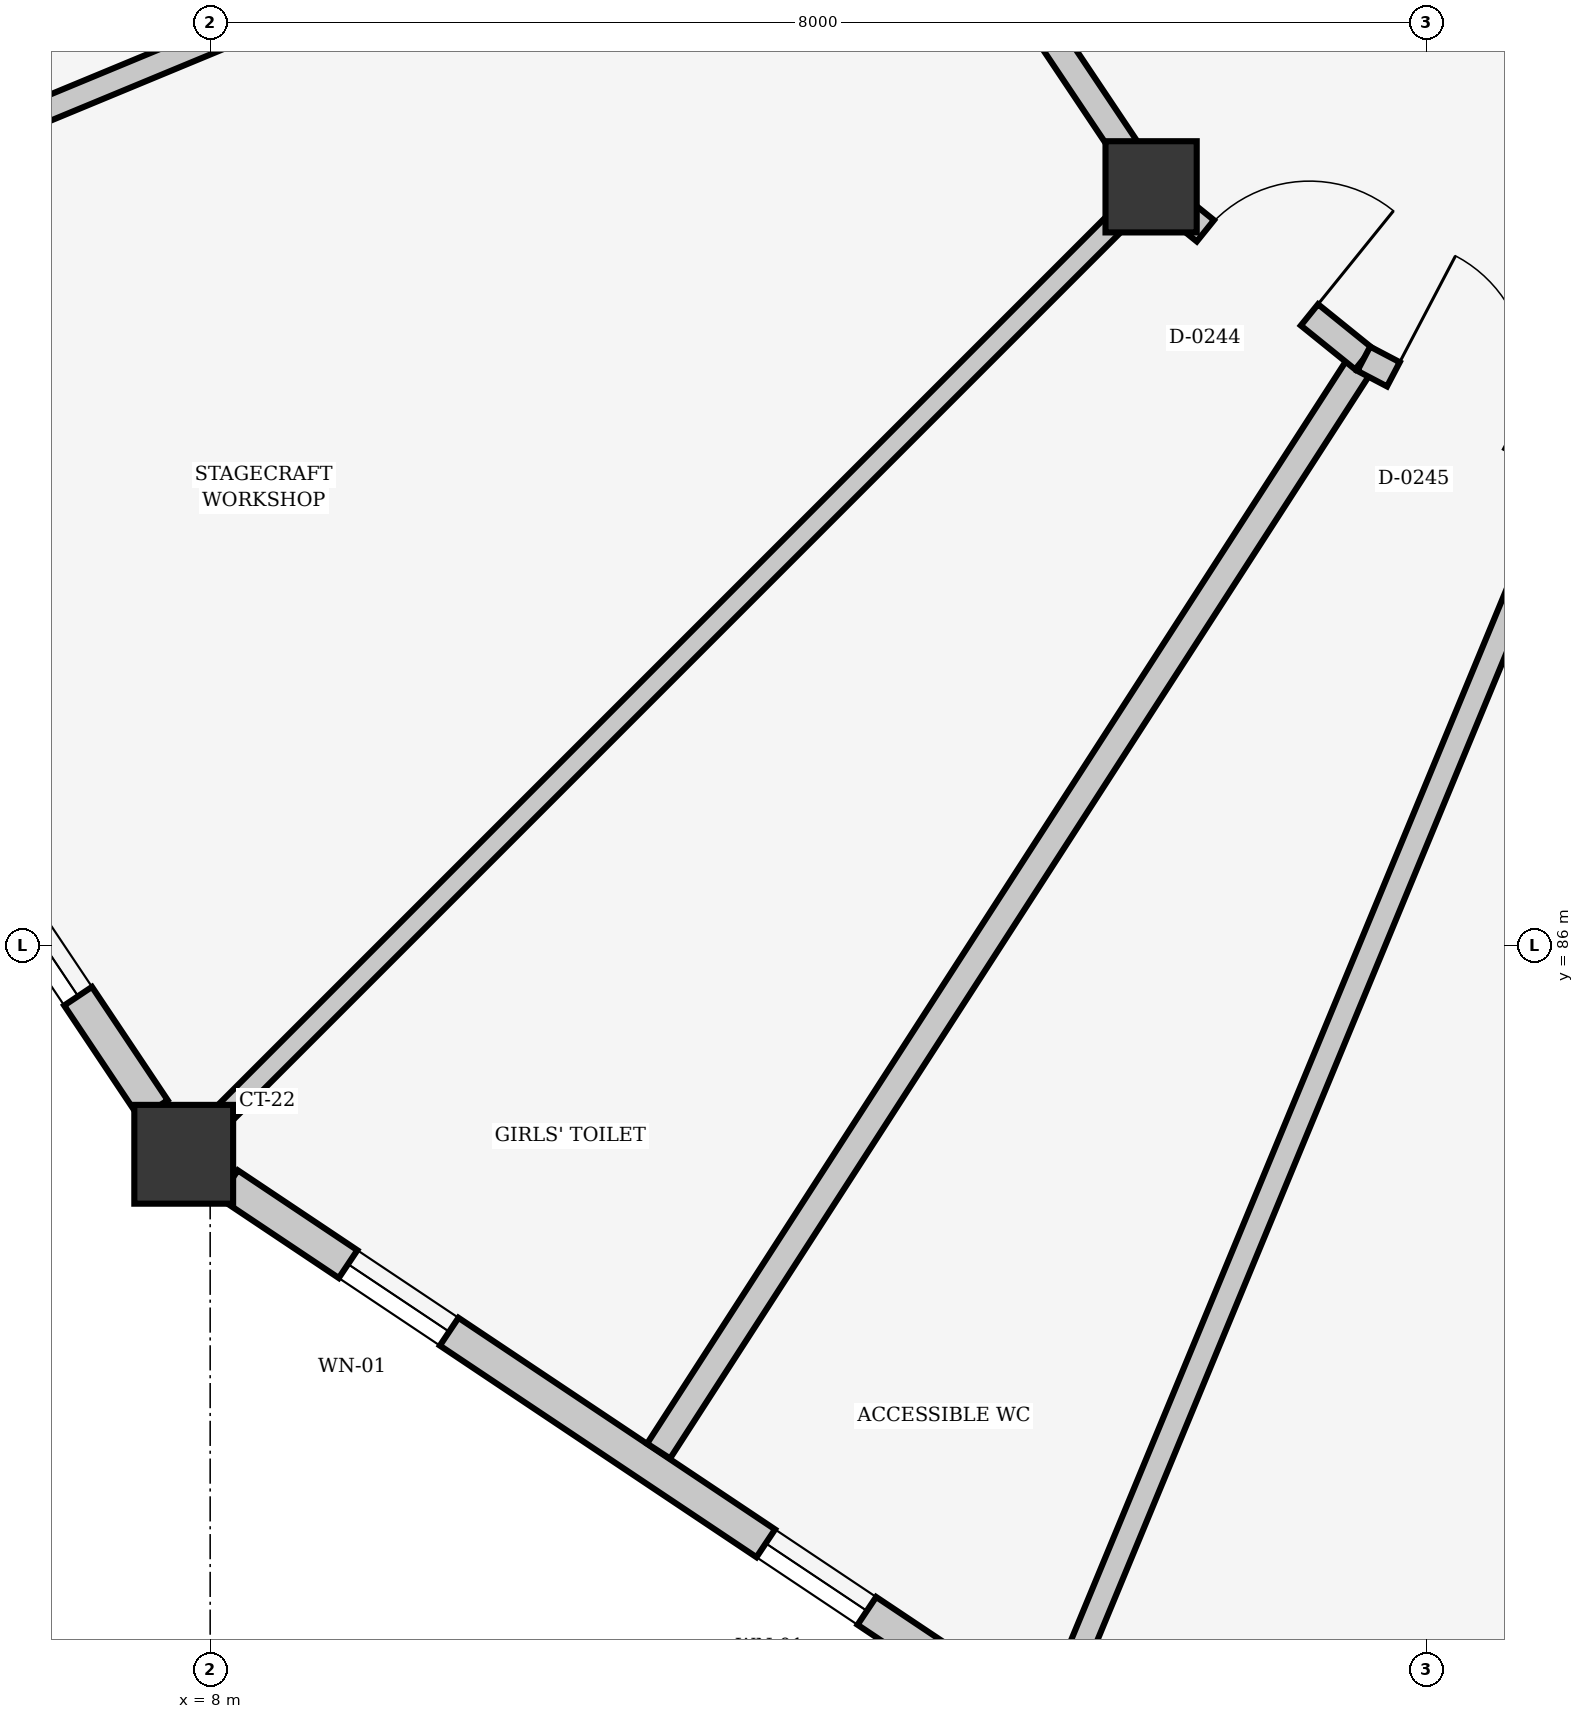
"""IFC4 building model, lengths in metres.
Left out: names, types, materials, properties, quantities, classifications, styles, units other than length and angle.
Written with IfcOpenShell. Run it as: python <this file> out.ifc"""

import sys

from ifc_helpers import new_model, si_unit, direction, frame, frame_2d, origin, origin_2d, place, context, subcontext, project, spatial, rectangle, extrude, element, fill, save


model = new_model("IFC4")
c1 = context("Model", 3, precision=1e-05, world=origin(), true_north=direction((0.0, 1.0)))
c2 = subcontext(c1, "Body", "Model", "MODEL_VIEW")
j1 = project(units=[si_unit("LENGTHUNIT", "METRE"), si_unit("PLANEANGLEUNIT", "RADIAN")], contexts=[c1])
p1 = place(None, origin())
s1 = spatial("IfcSite", under=j1, at=p1, CompositionType="ELEMENT")
p2 = place(p1, origin())
s2 = spatial("IfcBuilding", under=s1, at=p2, CompositionType="ELEMENT")
p3 = place(p2, origin())
s3 = spatial("IfcBuildingStorey", under=s2, at=p3, CompositionType="ELEMENT", Elevation=0.0)
p4 = place(p3, frame((14.19, 90.99, 0.0), z_axis=(0.0, 0.0, 1.0), x_axis=(-0.707106781187, -0.707106781187, 0.0)))
e1 = element("IfcColumn", 1, at=p4, inside=s3, PredefinedType="COLUMN", context=c2, shape_type="SweptSolid", body=[
    extrude(rectangle(XDim=0.6, YDim=0.6, at=origin_2d()), origin(), (0.0, 0.0, 1.0), 4.5),
])
p5 = place(p3, frame((7.826, 84.626, 0.0), z_axis=(0.0, 0.0, 1.0), x_axis=(-0.707106781187, -0.707106781187, 0.0)))
e2 = element("IfcColumn", 2, at=p5, inside=s3, PredefinedType="COLUMN", context=c2, shape_type="SweptSolid", body=[
    extrude(rectangle(XDim=0.65, YDim=0.65, at=origin_2d()), origin(), (0.0, 0.0, 1.0), 4.5),
])
p6 = place(p3, frame((7.629, 84.921, 0.0), z_axis=(0.0, 0.0, 1.0), x_axis=(-0.555657446161, 0.831411331728, 0.0)))
e3 = element("IfcWall", 3, at=p6, inside=s3, PredefinedType="SOLIDWALL", context=c2, shape_type="SweptSolid", body=[
    extrude(rectangle(XDim=6.119, YDim=0.22, at=frame_2d((3.059, 0.0))), origin(), (0.0, 0.0, 1.0), 3.55),
])
p7 = place(p6, frame((0.896, 0.0, 0.85)))
e4 = element("IfcOpeningElement", 4, at=p7, cuts=e3, PredefinedType="OPENING", context=c2, shape_type="SweptSolid", body=[
    extrude(rectangle(XDim=0.9, YDim=1.4, at=frame_2d((0.45, 0.7))), frame((0.0, 0.12, 0.0), z_axis=(0.0, -1.0, 0.0), x_axis=(1.0, 0.0, 0.0)), (0.0, 0.0, 1.0), 0.24),
])
p8 = place(p6, frame((2.609, 0.0, 0.85)))
e5 = element("IfcOpeningElement", 5, at=p8, cuts=e3, PredefinedType="OPENING", context=c2, shape_type="SweptSolid", body=[
    extrude(rectangle(XDim=0.9, YDim=1.4, at=frame_2d((0.45, 0.7))), frame((0.0, 0.12, 0.0), z_axis=(0.0, -1.0, 0.0), x_axis=(1.0, 0.0, 0.0)), (0.0, 0.0, 1.0), 0.24),
])
p9 = place(p6, frame((4.323, 0.0, 0.85)))
e6 = element("IfcOpeningElement", 6, at=p9, cuts=e3, PredefinedType="OPENING", context=c2, shape_type="SweptSolid", body=[
    extrude(rectangle(XDim=0.9, YDim=1.4, at=frame_2d((0.45, 0.7))), frame((0.0, 0.12, 0.0), z_axis=(0.0, -1.0, 0.0), x_axis=(1.0, 0.0, 0.0)), (0.0, 0.0, 1.0), 0.24),
])
p10 = place(p3, frame((13.208, 81.029, 0.0), z_axis=(0.0, 0.0, 1.0), x_axis=(-0.83139901156, 0.555675879967, 0.0)))
e7 = element("IfcWall", 7, at=p10, inside=s3, PredefinedType="SOLIDWALL", context=c2, shape_type="SweptSolid", body=[
    extrude(rectangle(XDim=6.118, YDim=0.22, at=frame_2d((3.059, 0.0))), origin(), (0.0, 0.0, 1.0), 3.55),
])
p11 = place(p10, frame((1.068, 0.0, 1.15)))
e8 = element("IfcOpeningElement", 8, at=p11, cuts=e7, PredefinedType="OPENING", context=c2, shape_type="SweptSolid", body=[
    extrude(rectangle(XDim=0.8, YDim=1.1, at=frame_2d((0.4, 0.55))), frame((0.0, 0.12, 0.0), z_axis=(0.0, -1.0, 0.0), x_axis=(1.0, 0.0, 0.0)), (0.0, 0.0, 1.0), 0.24),
])
p12 = place(p10, frame((4.373, 0.0, 1.15)))
e9 = element("IfcOpeningElement", 9, at=p12, cuts=e7, PredefinedType="OPENING", context=c2, shape_type="SweptSolid", body=[
    extrude(rectangle(XDim=0.8, YDim=1.1, at=frame_2d((0.4, 0.55))), frame((0.0, 0.12, 0.0), z_axis=(0.0, -1.0, 0.0), x_axis=(1.0, 0.0, 0.0)), (0.0, 0.0, 1.0), 0.24),
])
p13 = place(p3, frame((10.004, 92.777, 0.0), z_axis=(0.0, 0.0, 1.0), x_axis=(-0.923837705987, -0.382784394923, 0.0)))
e10 = element("IfcWall", 10, at=p13, inside=s3, PredefinedType="PARTITIONING", context=c2, shape_type="SweptSolid", body=[
    extrude(rectangle(XDim=6.147, YDim=0.16, at=frame_2d((3.074, 0.0))), origin(), (0.0, 0.0, 1.0), 3.552),
])
p14 = place(p3, frame((13.984, 90.784, 0.0), z_axis=(0.0, 0.0, 1.0), x_axis=(-0.707106781187, -0.707106781187, 0.0)))
e11 = element("IfcWall", 11, at=p14, inside=s3, PredefinedType="PARTITIONING", context=c2, shape_type="SweptSolid", body=[
    extrude(rectangle(XDim=8.392, YDim=0.14, at=frame_2d((4.196, 0.0))), origin(), (0.0, 0.0, 1.0), 3.552),
])
p15 = place(p3, frame((16.836, 88.877, 0.0), z_axis=(0.0, 0.0, 1.0), x_axis=(-0.382780060664, -0.923839501839, 0.0)))
e12 = element("IfcWall", 12, at=p15, inside=s3, PredefinedType="PARTITIONING", context=c2, shape_type="SweptSolid", body=[
    extrude(rectangle(XDim=8.391, YDim=0.16, at=frame_2d((4.196, 0.0))), origin(), (0.0, 0.0, 1.0), 3.552),
])
p16 = place(p3, frame((15.589, 89.859, 0.0), z_axis=(0.0, 0.0, 1.0), x_axis=(-0.542440235144, -0.840094394278, 0.0)))
e13 = element("IfcWall", 13, at=p16, inside=s3, PredefinedType="PARTITIONING", context=c2, shape_type="SweptSolid", body=[
    extrude(rectangle(XDim=8.552, YDim=0.18, at=frame_2d((4.276, 0.0))), origin(), (0.0, 0.0, 1.0), 3.552),
])
p17 = place(p3, frame((12.512, 93.499, 0.0), z_axis=(0.0, 0.0, 1.0), x_axis=(0.556128339679, -0.831096426298, 0.0)))
e14 = element("IfcWall", 14, at=p17, inside=s3, PredefinedType="PARTITIONING", context=c2, shape_type="SweptSolid", body=[
    extrude(rectangle(XDim=2.72, YDim=0.18, at=frame_2d((1.36, 0.0))), origin(), (0.0, 0.0, 1.0), 3.552),
])
p18 = place(p17, frame((0.9, 0.0, 0.0)))
e15 = element("IfcOpeningElement", 15, at=p18, cuts=e14, PredefinedType="OPENING", context=c2, shape_type="SweptSolid", body=[
    extrude(rectangle(XDim=0.92, YDim=2.1, at=frame_2d((0.46, 1.05))), frame((0.0, 0.1, 0.0), z_axis=(0.0, -1.0, 0.0), x_axis=(1.0, 0.0, 0.0)), (0.0, 0.0, 1.0), 0.2),
])
p19 = place(p3, frame((14.418, 90.805, 0.0), z_axis=(0.0, 0.0, 1.0), x_axis=(0.777901544977, -0.628386176107, 0.0)))
e16 = element("IfcWall", 16, at=p19, inside=s3, PredefinedType="PARTITIONING", context=c2, shape_type="SweptSolid", body=[
    extrude(rectangle(XDim=1.506, YDim=0.18, at=frame_2d((0.753, 0.0))), origin(), (0.0, 0.0, 1.0), 3.552),
])
p20 = place(p19, frame((0.166, 0.0, 0.0)))
e17 = element("IfcOpeningElement", 17, at=p20, cuts=e16, PredefinedType="OPENING", context=c2, shape_type="SweptSolid", body=[
    extrude(rectangle(XDim=0.88, YDim=2.1, at=frame_2d((0.44, 1.05))), frame((0.0, 0.1, 0.0), z_axis=(0.0, -1.0, 0.0), x_axis=(1.0, 0.0, 0.0)), (0.0, 0.0, 1.0), 0.2),
])
p21 = place(p3, frame((15.589, 89.859, 0.0), z_axis=(0.0, 0.0, 1.0), x_axis=(0.885553865366, -0.464536706337, 0.0)))
e18 = element("IfcWall", 18, at=p21, inside=s3, PredefinedType="PARTITIONING", context=c2, shape_type="SweptSolid", body=[
    extrude(rectangle(XDim=1.24, YDim=0.18, at=frame_2d((0.62, 0.0))), origin(), (0.0, 0.0, 1.0), 3.552),
])
p22 = place(p21, frame((0.22, 0.0, 0.0)))
e19 = element("IfcOpeningElement", 19, at=p22, cuts=e18, PredefinedType="OPENING", context=c2, shape_type="SweptSolid", body=[
    extrude(rectangle(XDim=0.88, YDim=2.1, at=frame_2d((0.44, 1.05))), frame((0.0, 0.1, 0.0), z_axis=(0.0, -1.0, 0.0), x_axis=(1.0, 0.0, 0.0)), (0.0, 0.0, 1.0), 0.2),
])
p23 = place(p7, origin())
e20 = element("IfcWindow", 20, at=p23, inside=s3, PartitioningType="SINGLE_PANEL", PredefinedType="WINDOW", context=c2, shape_type="SweptSolid", body=[
    extrude(rectangle(XDim=0.9, YDim=1.4, at=frame_2d((0.45, 0.7))), frame((0.0, 0.03, 0.0), z_axis=(0.0, -1.0, 0.0), x_axis=(1.0, 0.0, 0.0)), (0.0, 0.0, 1.0), 0.06),
])
fill(e4, e20)
p24 = place(p11, origin())
e21 = element("IfcWindow", 21, at=p24, inside=s3, PartitioningType="SINGLE_PANEL", PredefinedType="WINDOW", context=c2, shape_type="SweptSolid", body=[
    extrude(rectangle(XDim=0.8, YDim=1.1, at=frame_2d((0.4, 0.55))), frame((0.0, 0.03, 0.0), z_axis=(0.0, -1.0, 0.0), x_axis=(1.0, 0.0, 0.0)), (0.0, 0.0, 1.0), 0.06),
])
fill(e8, e21)
p25 = place(p12, origin())
e22 = element("IfcWindow", 22, at=p25, inside=s3, PartitioningType="SINGLE_PANEL", PredefinedType="WINDOW", context=c2, shape_type="SweptSolid", body=[
    extrude(rectangle(XDim=0.8, YDim=1.1, at=frame_2d((0.4, 0.55))), frame((0.0, 0.03, 0.0), z_axis=(0.0, -1.0, 0.0), x_axis=(1.0, 0.0, 0.0)), (0.0, 0.0, 1.0), 0.06),
])
fill(e9, e22)
p26 = place(p20, origin())
e23 = element("IfcDoor", 23, at=p26, inside=s3, OperationType="SINGLE_SWING_RIGHT", PredefinedType="DOOR", context=c2, shape_type="SweptSolid", body=[
    extrude(rectangle(XDim=0.88, YDim=2.1, at=frame_2d((0.44, 1.05))), frame((0.0, 0.025, 0.0), z_axis=(0.0, -1.0, 0.0), x_axis=(1.0, 0.0, 0.0)), (0.0, 0.0, 1.0), 0.05),
])
fill(e17, e23)
p27 = place(p22, origin())
e24 = element("IfcDoor", 24, at=p27, inside=s3, OperationType="SINGLE_SWING_LEFT", PredefinedType="DOOR", context=c2, shape_type="SweptSolid", body=[
    extrude(rectangle(XDim=0.88, YDim=2.1, at=frame_2d((0.44, 1.05))), frame((0.0, 0.025, 0.0), z_axis=(0.0, -1.0, 0.0), x_axis=(1.0, 0.0, 0.0)), (0.0, 0.0, 1.0), 0.05),
])
fill(e19, e24)
save(model, sys.argv[1])
